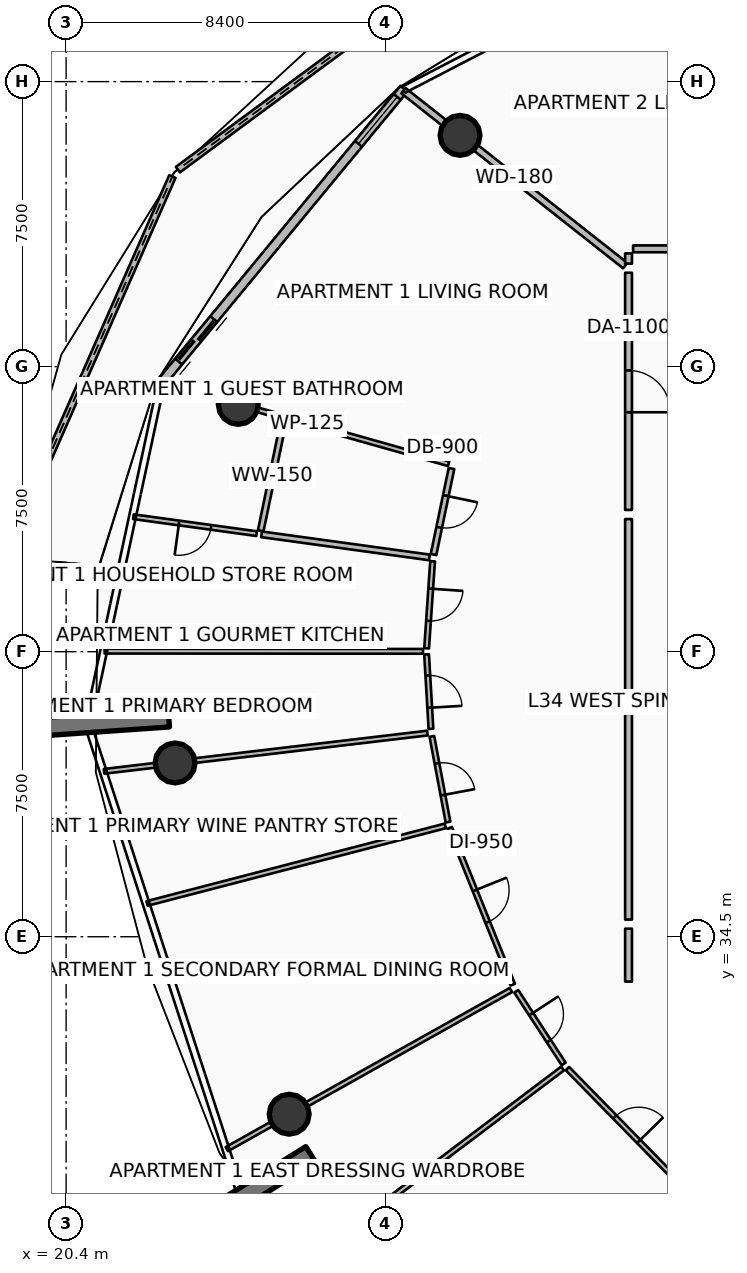
"""IFC4 building model, lengths in metres.
Left out: names, types, materials, properties, quantities, classifications, styles, units other than length and angle.
Written with IfcOpenShell. Run it as: python <this file> out.ifc"""

import sys

from ifc_helpers import new_model, si_unit, direction, frame, frame_2d, origin, origin_2d, place, context, subcontext, project, spatial, polyline, rectangle, circle, outline, extrude, element, fill, save


model = new_model("IFC4")
c1 = context("Model", 3, precision=1e-05, world=origin(), true_north=direction((0.0, 1.0)))
c2 = subcontext(c1, "Body", "Model", "MODEL_VIEW")
j1 = project(units=[si_unit("LENGTHUNIT", "METRE"), si_unit("PLANEANGLEUNIT", "RADIAN")], contexts=[c1])
p1 = place(None, origin())
s1 = spatial("IfcSite", under=j1, at=p1, CompositionType="ELEMENT")
p2 = place(p1, origin())
s2 = spatial("IfcBuilding", under=s1, at=p2, CompositionType="ELEMENT")
p3 = place(p2, frame((0.0, 0.0, 139.05)))
s3 = spatial("IfcBuildingStorey", under=s2, at=p3, CompositionType="ELEMENT", Elevation=139.05)
for number, where, z_axis, x_axis in (
    (1, (23.103, 40.259, 0.0), (0.0, 0.0, 1.0), (-0.998, -0.07, 0.0)),
    (2, (26.835, 28.774, 0.0), (0.0, 0.0, 1.0), (-0.848, -0.53, 0.0)),
):
    element("IfcWall", number, at=place(p3, frame(where, z_axis=z_axis, x_axis=x_axis)), inside=s3, PredefinedType="SOLIDWALL", context=c2, shape_type="SweptSolid", body=[
        extrude(rectangle(XDim=3.5, YDim=0.48, at=frame_2d((1.75, 0.0))), origin(), (0.0, 0.0, 1.0), 3.75),
    ])
for number, where, z_axis, x_axis in (
    (3, (30.766, 55.586, 0.0), (0.0, 0.0, 1.0), (1.0, 0.0, 0.0)),
    (4, (24.93, 48.506, 0.0), (0.0, 0.0, 1.0), (1.0, 0.0, 0.0)),
    (5, (23.267, 39.073, 0.0), (0.0, 0.0, 1.0), (1.0, 0.0, 0.0)),
    (6, (26.27, 29.831, 0.0), (0.0, 0.0, 1.0), (1.0, 0.0, 0.0)),
):
    element("IfcColumn", number, at=place(p3, frame(where, z_axis=z_axis, x_axis=x_axis)), inside=s3, PredefinedType="COLUMN", context=c2, shape_type="SweptSolid", body=[
        extrude(circle(Radius=0.525, at=origin_2d()), origin(), (0.0, 0.0, 1.0), 3.5),
    ])
p4 = place(p3, frame((31.7, 60.85, 0.0), z_axis=(0.0, 0.0, 1.0), x_axis=(-0.804716582715, -0.593659179584, 0.0)))
e7 = element("IfcWall", 7, at=p4, inside=s3, PredefinedType="PARAPET", context=c2, shape_type="SweptSolid", body=[
    extrude(outline(polyline([(0.0, 0.0), (10.386, 0.0), (10.386, 1.832), (5.193, 1.696), (0.0, 1.497), (0.0, 0.0)])), frame((0.0, 0.09, 0.0), z_axis=(0.0, -1.0, 0.0), x_axis=(1.0, 0.0, 0.0)), (0.0, 0.0, 1.0), 0.18),
])
p5 = place(p3, frame((23.197, 54.503, 0.0), z_axis=(0.0, 0.0, 1.0), x_axis=(-0.402973896797, -0.915211472011, 0.0)))
e8 = element("IfcWall", 8, at=p5, inside=s3, PredefinedType="PARAPET", context=c2, shape_type="SweptSolid", body=[
    extrude(outline(polyline([(0.0, 0.0), (10.953, 0.0), (10.953, 1.756), (5.477, 1.853), (0.0, 1.832), (0.0, 0.0)])), frame((0.0, 0.09, 0.0), z_axis=(0.0, -1.0, 0.0), x_axis=(1.0, 0.0, 0.0)), (0.0, 0.0, 1.0), 0.18),
])
p6 = place(p3, frame((29.291, 56.813, 0.0), z_axis=(0.0, 0.0, 1.0), x_axis=(-0.636771922292, -0.77105221547, 0.0)))
e9 = element("IfcWall", 9, at=p6, inside=s3, PredefinedType="SOLIDWALL", context=c2, shape_type="SweptSolid", body=[
    extrude(rectangle(XDim=10.082, YDim=0.24, at=frame_2d((5.041, 0.0))), origin(), (0.0, 0.0, 1.0), 2.45),
])
p7 = place(p6, frame((7.862, 0.0, 0.0)))
e10 = element("IfcOpeningElement", 10, at=p7, cuts=e9, PredefinedType="OPENING", context=c2, shape_type="SweptSolid", body=[
    extrude(rectangle(XDim=1.45, YDim=2.15, at=frame_2d((0.725, 1.075))), frame((0.0, 0.13, 0.0), z_axis=(0.0, -1.0, 0.0), x_axis=(1.0, 0.0, 0.0)), (0.0, 0.0, 1.0), 0.26),
])
p8 = place(p6, frame((0.28, 0.0, 0.65)))
e11 = element("IfcOpeningElement", 11, at=p8, cuts=e9, PredefinedType="OPENING", context=c2, shape_type="SweptSolid", body=[
    extrude(rectangle(XDim=1.6, YDim=1.5, at=frame_2d((0.8, 0.75))), frame((0.0, 0.13, 0.0), z_axis=(0.0, -1.0, 0.0), x_axis=(1.0, 0.0, 0.0)), (0.0, 0.0, 1.0), 0.26),
])
p9 = place(p3, frame((35.114, 52.159, 0.0), z_axis=(0.0, 0.0, 1.0), x_axis=(-0.78531739611, 0.619093359169, 0.0)))
e12 = element("IfcWall", 12, at=p9, inside=s3, PredefinedType="PARTITIONING", context=c2, shape_type="SweptSolid", body=[
    extrude(rectangle(XDim=7.43, YDim=0.18, at=frame_2d((3.715, 0.0))), origin(), (0.0, 0.0, 1.0), 2.94),
])
p10 = place(p3, frame((35.2, 51.971, 0.0), z_axis=(0.0, 0.0, 1.0), x_axis=(0.0, -1.0, 0.0)))
e13 = element("IfcWall", 13, at=p10, inside=s3, PredefinedType="PARTITIONING", context=c2, shape_type="SweptSolid", body=[
    extrude(rectangle(XDim=6.241, YDim=0.18, at=frame_2d((3.12, 0.0))), origin(), (0.0, 0.0, 1.0), 2.94),
])
p11 = place(p10, frame((2.57, 0.0, 0.0)))
e14 = element("IfcOpeningElement", 14, at=p11, cuts=e13, PredefinedType="OPENING", context=c2, shape_type="SweptSolid", body=[
    extrude(rectangle(XDim=1.1, YDim=2.1, at=frame_2d((0.55, 1.05))), frame((0.0, 0.1, 0.0), z_axis=(0.0, -1.0, 0.0), x_axis=(1.0, 0.0, 0.0)), (0.0, 0.0, 1.0), 0.2),
])
p12 = place(p3, frame((35.2, 45.49, 0.0), z_axis=(0.0, 0.0, 1.0), x_axis=(0.0, -1.0, 0.0)))
e15 = element("IfcWall", 15, at=p12, inside=s3, PredefinedType="PARTITIONING", context=c2, shape_type="SweptSolid", body=[
    extrude(rectangle(XDim=4.885, YDim=0.18, at=frame_2d((2.442, 0.0))), origin(), (0.0, 0.0, 1.0), 2.94),
])
p13 = place(p3, frame((30.465, 46.945, 0.0), z_axis=(0.0, 0.0, 1.0), x_axis=(-0.962456021196, 0.271437667363, 0.0)))
e16 = element("IfcWall", 16, at=p13, inside=s3, PredefinedType="PARTITIONING", context=c2, shape_type="SweptSolid", body=[
    extrude(rectangle(XDim=7.732, YDim=0.125, at=frame_2d((3.866, 0.0))), origin(), (0.0, 0.0, 1.0), 2.94),
])
p14 = place(p3, frame((30.541, 46.82, 0.0), z_axis=(0.0, 0.0, 1.0), x_axis=(-0.20437157278, -0.978893385533, 0.0)))
e17 = element("IfcWall", 17, at=p14, inside=s3, PredefinedType="PARTITIONING", context=c2, shape_type="SweptSolid", body=[
    extrude(rectangle(XDim=2.313, YDim=0.15, at=frame_2d((1.156, 0.0))), origin(), (0.0, 0.0, 1.0), 2.94),
])
p15 = place(p14, frame((0.731, 0.0, 0.0)))
e18 = element("IfcOpeningElement", 18, at=p15, cuts=e17, PredefinedType="OPENING", context=c2, shape_type="SweptSolid", body=[
    extrude(rectangle(XDim=0.85, YDim=2.06, at=frame_2d((0.425, 1.03))), frame((0.0, 0.085, 0.0), z_axis=(0.0, -1.0, 0.0), x_axis=(1.0, 0.0, 0.0)), (0.0, 0.0, 1.0), 0.17),
])
p16 = place(p3, frame((26.123, 48.066, 0.0), z_axis=(0.0, 0.0, 1.0), x_axis=(-0.204410847423, -0.978885185022, 0.0)))
e19 = element("IfcWall", 19, at=p16, inside=s3, PredefinedType="PARTITIONING", context=c2, shape_type="SweptSolid", body=[
    extrude(rectangle(XDim=2.947, YDim=0.15, at=frame_2d((1.473, 0.0))), origin(), (0.0, 0.0, 1.0), 2.94),
])
p17 = place(p3, frame((29.961, 44.481, 0.0), z_axis=(0.0, 0.0, 1.0), x_axis=(-0.99067496126, 0.136246545396, 0.0)))
e20 = element("IfcWall", 20, at=p17, inside=s3, PredefinedType="PARTITIONING", context=c2, shape_type="SweptSolid", body=[
    extrude(rectangle(XDim=4.46, YDim=0.15, at=frame_2d((2.23, 0.0))), origin(), (0.0, 0.0, 1.0), 2.94),
])
p18 = place(p3, frame((25.414, 45.106, 0.0), z_axis=(0.0, 0.0, 1.0), x_axis=(-0.990676070786, 0.136238477576, 0.0)))
e21 = element("IfcWall", 21, at=p18, inside=s3, PredefinedType="PARTITIONING", context=c2, shape_type="SweptSolid", body=[
    extrude(rectangle(XDim=3.272, YDim=0.125, at=frame_2d((1.636, 0.0))), origin(), (0.0, 0.0, 1.0), 2.94),
])
p19 = place(p18, frame((1.211, 0.0, 0.0)))
e22 = element("IfcOpeningElement", 22, at=p19, cuts=e21, PredefinedType="OPENING", context=c2, shape_type="SweptSolid", body=[
    extrude(rectangle(XDim=0.85, YDim=2.06, at=frame_2d((0.425, 1.03))), frame((0.0, 0.073, 0.0), z_axis=(0.0, -1.0, 0.0), x_axis=(1.0, 0.0, 0.0)), (0.0, 0.0, 1.0), 0.145),
])
p20 = place(p3, frame((29.791, 42.01, 0.0), z_axis=(0.0, 0.0, 1.0), x_axis=(-0.999999862447, 0.000524506018, 0.0)))
e23 = element("IfcWall", 23, at=p20, inside=s3, PredefinedType="PARTITIONING", context=c2, shape_type="SweptSolid", body=[
    extrude(rectangle(XDim=8.378, YDim=0.125, at=frame_2d((4.189, 0.0))), origin(), (0.0, 0.0, 1.0), 2.94),
])
p21 = place(p3, frame((30.044, 44.379, 0.0), z_axis=(0.0, 0.0, 1.0), x_axis=(-0.068510010266, -0.997650429005, 0.0)))
e24 = element("IfcWall", 24, at=p21, inside=s3, PredefinedType="PARTITIONING", context=c2, shape_type="SweptSolid", body=[
    extrude(rectangle(XDim=2.295, YDim=0.125, at=frame_2d((1.147, 0.0))), origin(), (0.0, 0.0, 1.0), 2.94),
])
p22 = place(p21, frame((0.722, 0.0, 0.0)))
e25 = element("IfcOpeningElement", 25, at=p22, cuts=e24, PredefinedType="OPENING", context=c2, shape_type="SweptSolid", body=[
    extrude(rectangle(XDim=0.85, YDim=2.06, at=frame_2d((0.425, 1.03))), frame((0.0, 0.073, 0.0), z_axis=(0.0, -1.0, 0.0), x_axis=(1.0, 0.0, 0.0)), (0.0, 0.0, 1.0), 0.145),
])
p23 = place(p3, frame((29.886, 41.929, 0.0), z_axis=(0.0, 0.0, 1.0), x_axis=(0.058590761666, -0.998282085709, 0.0)))
e26 = element("IfcWall", 26, at=p23, inside=s3, PredefinedType="PARTITIONING", context=c2, shape_type="SweptSolid", body=[
    extrude(rectangle(XDim=1.963, YDim=0.125, at=frame_2d((0.981, 0.0))), origin(), (0.0, 0.0, 1.0), 2.94),
])
p24 = place(p23, frame((0.556, 0.0, 0.0)))
e27 = element("IfcOpeningElement", 27, at=p24, cuts=e26, PredefinedType="OPENING", context=c2, shape_type="SweptSolid", body=[
    extrude(rectangle(XDim=0.85, YDim=2.06, at=frame_2d((0.425, 1.03))), frame((0.0, 0.073, 0.0), z_axis=(0.0, -1.0, 0.0), x_axis=(1.0, 0.0, 0.0)), (0.0, 0.0, 1.0), 0.145),
])
p25 = place(p3, frame((35.2, 40.365, 0.0), z_axis=(0.0, 0.0, 1.0), x_axis=(0.0, -1.0, 0.0)))
e28 = element("IfcWall", 28, at=p25, inside=s3, PredefinedType="PARTITIONING", context=c2, shape_type="SweptSolid", body=[
    extrude(rectangle(XDim=5.413, YDim=0.18, at=frame_2d((2.707, 0.0))), origin(), (0.0, 0.0, 1.0), 2.94),
])
p26 = place(p3, frame((29.907, 39.858, 0.0), z_axis=(0.0, 0.0, 1.0), x_axis=(-0.993070228419, -0.117522429465, 0.0)))
e29 = element("IfcWall", 29, at=p26, inside=s3, PredefinedType="PARTITIONING", context=c2, shape_type="SweptSolid", body=[
    extrude(rectangle(XDim=8.567, YDim=0.125, at=frame_2d((4.284, 0.0))), origin(), (0.0, 0.0, 1.0), 2.94),
])
p27 = place(p3, frame((30.377, 37.416, 0.0), z_axis=(0.0, 0.0, 1.0), x_axis=(-0.967798305948, -0.251726913549, 0.0)))
e30 = element("IfcWall", 30, at=p27, inside=s3, PredefinedType="PARTITIONING", context=c2, shape_type="SweptSolid", body=[
    extrude(rectangle(XDim=8.109, YDim=0.125, at=frame_2d((4.055, 0.0))), origin(), (0.0, 0.0, 1.0), 2.94),
])
p28 = place(p3, frame((30.025, 39.772, 0.0), z_axis=(0.0, 0.0, 1.0), x_axis=(0.185072404157, -0.98272488786, 0.0)))
e31 = element("IfcWall", 31, at=p28, inside=s3, PredefinedType="PARTITIONING", context=c2, shape_type="SweptSolid", body=[
    extrude(rectangle(XDim=2.294, YDim=0.125, at=frame_2d((1.147, 0.0))), origin(), (0.0, 0.0, 1.0), 2.94),
])
p29 = place(p28, frame((0.722, 0.0, 0.0)))
e32 = element("IfcOpeningElement", 32, at=p29, cuts=e31, PredefinedType="OPENING", context=c2, shape_type="SweptSolid", body=[
    extrude(rectangle(XDim=0.85, YDim=2.06, at=frame_2d((0.425, 1.03))), frame((0.0, 0.073, 0.0), z_axis=(0.0, -1.0, 0.0), x_axis=(1.0, 0.0, 0.0)), (0.0, 0.0, 1.0), 0.145),
])
p30 = place(p3, frame((30.494, 37.365, 0.0), z_axis=(0.0, 0.0, 1.0), x_axis=(0.373198093248, -0.927751681861, 0.0)))
e33 = element("IfcWall", 33, at=p30, inside=s3, PredefinedType="PARTITIONING", context=c2, shape_type="SweptSolid", body=[
    extrude(rectangle(XDim=4.447, YDim=0.125, at=frame_2d((2.223, 0.0))), origin(), (0.0, 0.0, 1.0), 2.94),
])
p31 = place(p30, frame((1.773, 0.0, 0.0)))
e34 = element("IfcOpeningElement", 34, at=p31, cuts=e33, PredefinedType="OPENING", context=c2, shape_type="SweptSolid", body=[
    extrude(rectangle(XDim=0.9, YDim=2.08, at=frame_2d((0.45, 1.04))), frame((0.0, 0.073, 0.0), z_axis=(0.0, -1.0, 0.0), x_axis=(1.0, 0.0, 0.0)), (0.0, 0.0, 1.0), 0.145),
])
p32 = place(p3, frame((35.2, 34.712, 0.0), z_axis=(0.0, 0.0, 1.0), x_axis=(0.0, -1.0, 0.0)))
e35 = element("IfcWall", 35, at=p32, inside=s3, PredefinedType="PARTITIONING", context=c2, shape_type="SweptSolid", body=[
    extrude(rectangle(XDim=1.392, YDim=0.18, at=frame_2d((0.696, 0.0))), origin(), (0.0, 0.0, 1.0), 2.94),
])
p33 = place(p3, frame((32.104, 33.098, 0.0), z_axis=(0.0, 0.0, 1.0), x_axis=(-0.872488035617, -0.488635475283, 0.0)))
e36 = element("IfcWall", 36, at=p33, inside=s3, PredefinedType="PARTITIONING", context=c2, shape_type="SweptSolid", body=[
    extrude(rectangle(XDim=8.567, YDim=0.125, at=frame_2d((4.284, 0.0))), origin(), (0.0, 0.0, 1.0), 2.94),
])
p34 = place(p3, frame((33.464, 31.033, 0.0), z_axis=(0.0, 0.0, 1.0), x_axis=(-0.798260006805, -0.602313009602, 0.0)))
e37 = element("IfcWall", 37, at=p34, inside=s3, PredefinedType="PARTITIONING", context=c2, shape_type="SweptSolid", body=[
    extrude(rectangle(XDim=8.283, YDim=0.125, at=frame_2d((4.142, 0.0))), origin(), (0.0, 0.0, 1.0), 2.94),
])
p35 = place(p3, frame((32.246, 33.063, 0.0), z_axis=(0.0, 0.0, 1.0), x_axis=(0.54671843355, -0.837316519852, 0.0)))
e38 = element("IfcWall", 38, at=p35, inside=s3, PredefinedType="PARTITIONING", context=c2, shape_type="SweptSolid", body=[
    extrude(rectangle(XDim=2.28, YDim=0.125, at=frame_2d((1.14, 0.0))), origin(), (0.0, 0.0, 1.0), 2.94),
])
p36 = place(p35, frame((0.715, 0.0, 0.0)))
e39 = element("IfcOpeningElement", 39, at=p36, cuts=e38, PredefinedType="OPENING", context=c2, shape_type="SweptSolid", body=[
    extrude(rectangle(XDim=0.85, YDim=2.06, at=frame_2d((0.425, 1.03))), frame((0.0, 0.073, 0.0), z_axis=(0.0, -1.0, 0.0), x_axis=(1.0, 0.0, 0.0)), (0.0, 0.0, 1.0), 0.145),
])
p37 = place(p3, frame((33.592, 31.03, 0.0), z_axis=(0.0, 0.0, 1.0), x_axis=(0.699540960256, -0.714592502707, 0.0)))
e40 = element("IfcWall", 40, at=p37, inside=s3, PredefinedType="PARTITIONING", context=c2, shape_type="SweptSolid", body=[
    extrude(rectangle(XDim=4.461, YDim=0.125, at=frame_2d((2.23, 0.0))), origin(), (0.0, 0.0, 1.0), 2.94),
])
p38 = place(p37, frame((1.78, 0.0, 0.0)))
e41 = element("IfcOpeningElement", 41, at=p38, cuts=e40, PredefinedType="OPENING", context=c2, shape_type="SweptSolid", body=[
    extrude(rectangle(XDim=0.9, YDim=2.08, at=frame_2d((0.45, 1.04))), frame((0.0, 0.073, 0.0), z_axis=(0.0, -1.0, 0.0), x_axis=(1.0, 0.0, 0.0)), (0.0, 0.0, 1.0), 0.145),
])
p39 = place(p3, frame((41.944, 52.6, 0.0), z_axis=(0.0, 0.0, 1.0), x_axis=(-1.0, 0.0, 0.0)))
e42 = element("IfcWall", 42, at=p39, inside=s3, PredefinedType="PARTITIONING", context=c2, shape_type="SweptSolid", body=[
    extrude(rectangle(XDim=6.624, YDim=0.18, at=frame_2d((3.312, 0.0))), origin(), (0.0, 0.0, 1.0), 2.94),
])
p40 = place(p39, frame((2.762, 0.0, 0.0)))
e43 = element("IfcOpeningElement", 43, at=p40, cuts=e42, PredefinedType="OPENING", context=c2, shape_type="SweptSolid", body=[
    extrude(rectangle(XDim=1.1, YDim=2.1, at=frame_2d((0.55, 1.05))), frame((0.0, 0.1, 0.0), z_axis=(0.0, -1.0, 0.0), x_axis=(1.0, 0.0, 0.0)), (0.0, 0.0, 1.0), 0.2),
])
p41 = place(p3, frame((35.2, 52.48, 0.0), z_axis=(0.0, 0.0, 1.0), x_axis=(0.0, -1.0, 0.0)))
e44 = element("IfcWall", 44, at=p41, inside=s3, PredefinedType="PARTITIONING", context=c2, shape_type="SweptSolid", body=[
    extrude(rectangle(XDim=0.269, YDim=0.18, at=frame_2d((0.135, 0.0))), origin(), (0.0, 0.0, 1.0), 2.94),
])
p42 = place(p7, origin())
e45 = element("IfcDoor", 45, at=p42, inside=s3, OperationType="DOUBLE_DOOR_SLIDING", PredefinedType="DOOR", context=c2, shape_type="SweptSolid", body=[
    extrude(rectangle(XDim=1.45, YDim=2.15, at=frame_2d((0.725, 1.075))), frame((0.0, 0.025, 0.0), z_axis=(0.0, -1.0, 0.0), x_axis=(1.0, 0.0, 0.0)), (0.0, 0.0, 1.0), 0.05),
])
fill(e10, e45)
p43 = place(p8, origin())
e46 = element("IfcWindow", 46, at=p43, inside=s3, PartitioningType="SINGLE_PANEL", PredefinedType="WINDOW", context=c2, shape_type="SweptSolid", body=[
    extrude(rectangle(XDim=1.6, YDim=1.5, at=frame_2d((0.8, 0.75))), frame((0.0, 0.03, 0.0), z_axis=(0.0, -1.0, 0.0), x_axis=(1.0, 0.0, 0.0)), (0.0, 0.0, 1.0), 0.06),
])
fill(e11, e46)
p44 = place(p11, origin())
e47 = element("IfcDoor", 47, at=p44, inside=s3, OperationType="SINGLE_SWING_RIGHT", PredefinedType="DOOR", context=c2, shape_type="SweptSolid", body=[
    extrude(rectangle(XDim=1.1, YDim=2.1, at=frame_2d((0.55, 1.05))), frame((0.0, 0.025, 0.0), z_axis=(0.0, -1.0, 0.0), x_axis=(1.0, 0.0, 0.0)), (0.0, 0.0, 1.0), 0.05),
])
fill(e14, e47)
p45 = place(p15, origin())
e48 = element("IfcDoor", 48, at=p45, inside=s3, OperationType="SINGLE_SWING_LEFT", PredefinedType="DOOR", context=c2, shape_type="SweptSolid", body=[
    extrude(rectangle(XDim=0.85, YDim=2.06, at=frame_2d((0.425, 1.03))), frame((0.0, 0.025, 0.0), z_axis=(0.0, -1.0, 0.0), x_axis=(1.0, 0.0, 0.0)), (0.0, 0.0, 1.0), 0.05),
])
fill(e18, e48)
p46 = place(p19, origin())
e49 = element("IfcDoor", 49, at=p46, inside=s3, OperationType="SINGLE_SWING_RIGHT", PredefinedType="DOOR", context=c2, shape_type="SweptSolid", body=[
    extrude(rectangle(XDim=0.85, YDim=2.06, at=frame_2d((0.425, 1.03))), frame((0.0, 0.025, 0.0), z_axis=(0.0, -1.0, 0.0), x_axis=(1.0, 0.0, 0.0)), (0.0, 0.0, 1.0), 0.05),
])
fill(e22, e49)
p47 = place(p22, origin())
e50 = element("IfcDoor", 50, at=p47, inside=s3, OperationType="SINGLE_SWING_LEFT", PredefinedType="DOOR", context=c2, shape_type="SweptSolid", body=[
    extrude(rectangle(XDim=0.85, YDim=2.06, at=frame_2d((0.425, 1.03))), frame((0.0, 0.025, 0.0), z_axis=(0.0, -1.0, 0.0), x_axis=(1.0, 0.0, 0.0)), (0.0, 0.0, 1.0), 0.05),
])
fill(e25, e50)
p48 = place(p24, origin())
e51 = element("IfcDoor", 51, at=p48, inside=s3, OperationType="SINGLE_SWING_RIGHT", PredefinedType="DOOR", context=c2, shape_type="SweptSolid", body=[
    extrude(rectangle(XDim=0.85, YDim=2.06, at=frame_2d((0.425, 1.03))), frame((0.0, 0.025, 0.0), z_axis=(0.0, -1.0, 0.0), x_axis=(1.0, 0.0, 0.0)), (0.0, 0.0, 1.0), 0.05),
])
fill(e27, e51)
p49 = place(p29, origin())
e52 = element("IfcDoor", 52, at=p49, inside=s3, OperationType="SINGLE_SWING_RIGHT", PredefinedType="DOOR", context=c2, shape_type="SweptSolid", body=[
    extrude(rectangle(XDim=0.85, YDim=2.06, at=frame_2d((0.425, 1.03))), frame((0.0, 0.025, 0.0), z_axis=(0.0, -1.0, 0.0), x_axis=(1.0, 0.0, 0.0)), (0.0, 0.0, 1.0), 0.05),
])
fill(e32, e52)
p50 = place(p31, origin())
e53 = element("IfcDoor", 53, at=p50, inside=s3, OperationType="SINGLE_SWING_LEFT", PredefinedType="DOOR", context=c2, shape_type="SweptSolid", body=[
    extrude(rectangle(XDim=0.9, YDim=2.08, at=frame_2d((0.45, 1.04))), frame((0.0, 0.025, 0.0), z_axis=(0.0, -1.0, 0.0), x_axis=(1.0, 0.0, 0.0)), (0.0, 0.0, 1.0), 0.05),
])
fill(e34, e53)
p51 = place(p36, origin())
e54 = element("IfcDoor", 54, at=p51, inside=s3, OperationType="SINGLE_SWING_LEFT", PredefinedType="DOOR", context=c2, shape_type="SweptSolid", body=[
    extrude(rectangle(XDim=0.85, YDim=2.06, at=frame_2d((0.425, 1.03))), frame((0.0, 0.025, 0.0), z_axis=(0.0, -1.0, 0.0), x_axis=(1.0, 0.0, 0.0)), (0.0, 0.0, 1.0), 0.05),
])
fill(e39, e54)
p52 = place(p38, origin())
e55 = element("IfcDoor", 55, at=p52, inside=s3, OperationType="SINGLE_SWING_RIGHT", PredefinedType="DOOR", context=c2, shape_type="SweptSolid", body=[
    extrude(rectangle(XDim=0.9, YDim=2.08, at=frame_2d((0.45, 1.04))), frame((0.0, 0.025, 0.0), z_axis=(0.0, -1.0, 0.0), x_axis=(1.0, 0.0, 0.0)), (0.0, 0.0, 1.0), 0.05),
])
fill(e41, e55)
save(model, sys.argv[1])
